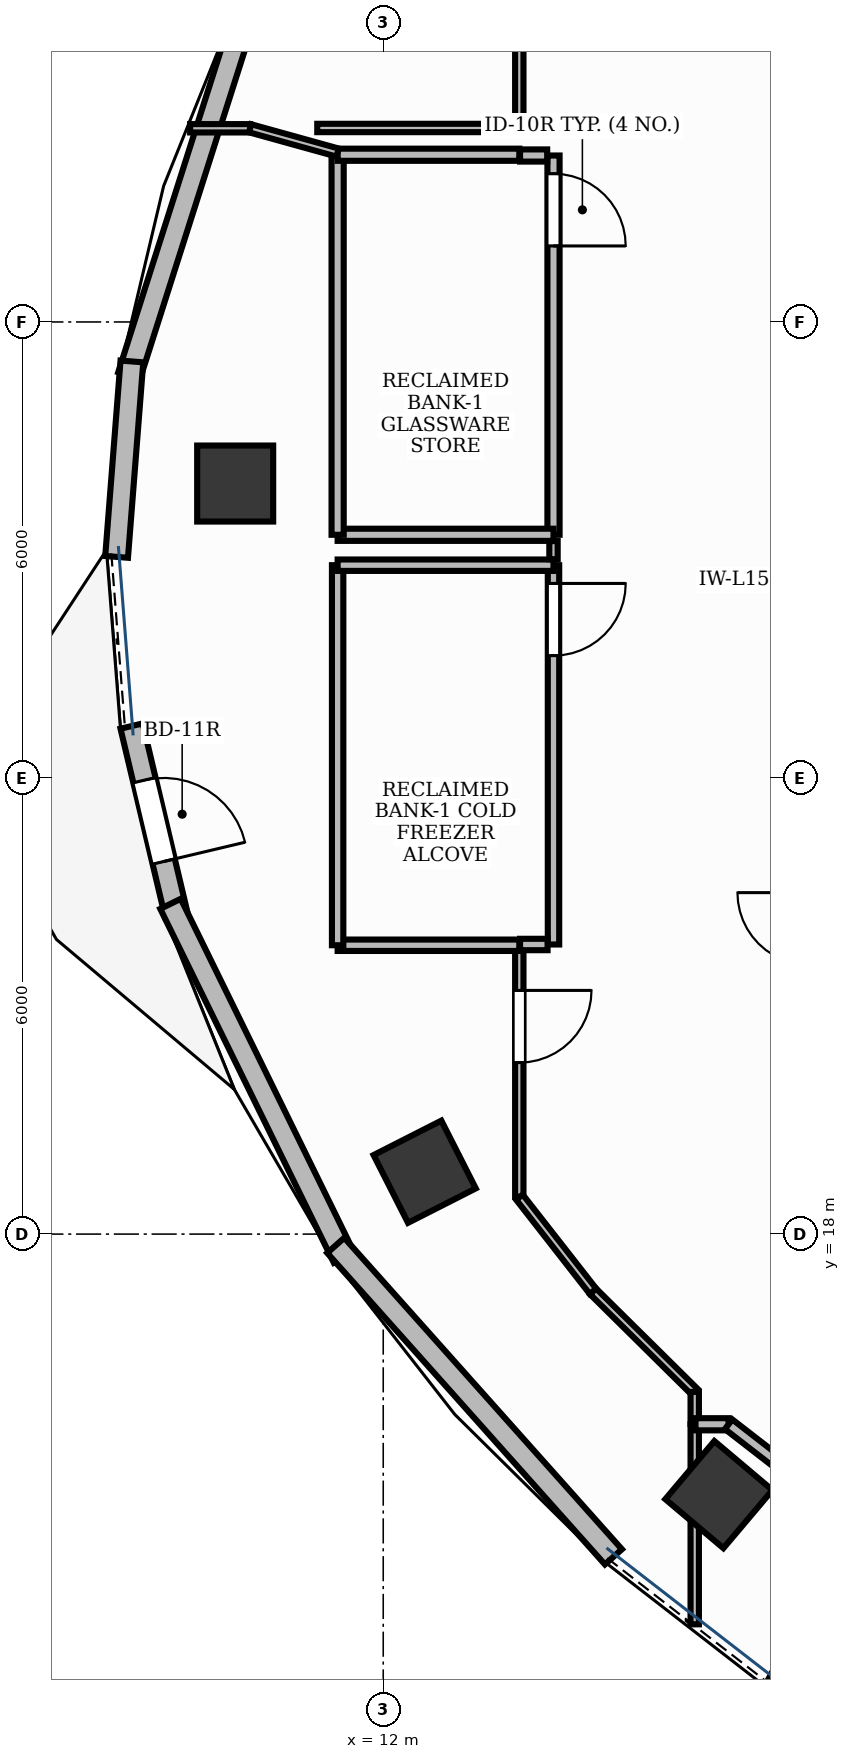
"""IFC4 building model, lengths in metres.
Left out: names, types, materials, properties, quantities, classifications, styles, units other than length and angle.
Written with IfcOpenShell. Run it as: python <this file> out.ifc"""

import sys

from ifc_helpers import new_model, si_unit, direction, frame, frame_2d, origin, origin_2d, place, context, subcontext, project, spatial, rectangle, extrude, element, fill, save


model = new_model("IFC4")
c1 = context("Model", 3, precision=1e-05, world=origin(), true_north=direction((0.0, 1.0)))
c2 = subcontext(c1, "Body", "Model", "MODEL_VIEW")
j1 = project(units=[si_unit("LENGTHUNIT", "METRE"), si_unit("PLANEANGLEUNIT", "RADIAN")], contexts=[c1])
p1 = place(None, origin())
s1 = spatial("IfcSite", under=j1, at=p1, CompositionType="ELEMENT")
p2 = place(p1, origin())
s2 = spatial("IfcBuilding", under=s1, at=p2, CompositionType="ELEMENT")
p3 = place(p2, frame((0.0, 0.0, 208.8)))
s3 = spatial("IfcBuildingStorey", under=s2, at=p3, CompositionType="ELEMENT", Elevation=208.8)
for number, where, z_axis, x_axis in (
    (1, (10.052, 27.874, -0.0), (0.0, 0.0, 1.0), (0.0, 1.0, 0.0)),
    (2, (12.545, 18.82, -0.0), (0.0, 0.0, 1.0), (-0.453, 0.891, 0.0)),
    (3, (16.416, 14.573, -0.0), (0.0, 0.0, 1.0), (-0.764, 0.645, 0.0)),
):
    element("IfcColumn", number, at=place(p3, frame(where, z_axis=z_axis, x_axis=x_axis)), inside=s3, PredefinedType="COLUMN", context=c2, shape_type="SweptSolid", body=[
        extrude(rectangle(XDim=1.0, YDim=1.0, at=origin_2d()), origin(), (0.0, 0.0, 1.0), 3.881),
    ])
p4 = place(p3, frame((8.689, 24.684, 0.0), z_axis=(0.0, 0.0, 1.0), x_axis=(0.230615918203, -0.973044859332, 0.0)))
e4 = element("IfcWall", 4, at=p4, inside=s3, PredefinedType="STANDARD", context=c2, shape_type="SweptSolid", body=[
    extrude(rectangle(XDim=2.563, YDim=0.3, at=frame_2d((1.281, 0.0))), origin(), (0.0, 0.0, 1.0), 3.88),
])
p5 = place(p4, frame((0.731, 0.0, 0.0)))
e5 = element("IfcOpeningElement", 5, at=p5, cuts=e4, PredefinedType="OPENING", context=c2, shape_type="SweptSolid", body=[
    extrude(rectangle(XDim=1.1, YDim=2.15, at=frame_2d((0.55, 1.075))), frame((0.0, 0.165, 0.0), z_axis=(0.0, -1.0, 0.0), x_axis=(1.0, 0.0, 0.0)), (0.0, 0.0, 1.0), 0.33),
])
p6 = place(p3, frame((10.198, 34.13, 0.0), z_axis=(0.0, 0.0, 1.0), x_axis=(-0.30372166002, -0.952760805887, 0.0)))
e6 = element("IfcWall", 6, at=p6, inside=s3, PredefinedType="STANDARD", context=c2, shape_type="SweptSolid", body=[
    extrude(rectangle(XDim=5.077, YDim=0.3, at=frame_2d((2.539, 0.0))), origin(), (0.0, 0.0, 1.0), 3.88),
])
p7 = place(p3, frame((8.693, 29.48, 0.0), z_axis=(0.0, 0.0, 1.0), x_axis=(-0.077999392987, -0.996953406481, 0.0)))
e7 = element("IfcWall", 7, at=p7, inside=s3, PredefinedType="STANDARD", context=c2, shape_type="SweptSolid", body=[
    extrude(rectangle(XDim=2.579, YDim=0.3, at=frame_2d((1.29, 0.0))), origin(), (0.0, 0.0, 1.0), 2.205),
])
p8 = place(p3, frame((9.201, 22.345, 0.0), z_axis=(0.0, 0.0, 1.0), x_axis=(0.440271072247, -0.897864902389, 0.0)))
e8 = element("IfcWall", 8, at=p8, inside=s3, PredefinedType="STANDARD", context=c2, shape_type="SweptSolid", body=[
    extrude(rectangle(XDim=5.187, YDim=0.3, at=frame_2d((2.593, 0.0))), origin(), (0.0, 0.0, 1.0), 2.205),
])
p9 = place(p3, frame((11.375, 17.851, 0.0), z_axis=(0.0, 0.0, 1.0), x_axis=(0.66549767703, -0.746399920866, 0.0)))
e9 = element("IfcWall", 9, at=p9, inside=s3, PredefinedType="STANDARD", context=c2, shape_type="SweptSolid", body=[
    extrude(rectangle(XDim=5.489, YDim=0.3, at=frame_2d((2.745, 0.0))), origin(), (0.0, 0.0, 1.0), 2.205),
])
p10 = place(p3, frame((17.079, 12.167, 0.0), z_axis=(0.0, 0.0, 1.0), x_axis=(0.88123472541, -0.472678917164, 0.0)))
e10 = element("IfcWall", 10, at=p10, inside=s3, PredefinedType="STANDARD", context=c2, shape_type="SweptSolid", body=[
    extrude(rectangle(XDim=5.997, YDim=0.3, at=frame_2d((2.998, 0.0))), origin(), (0.0, 0.0, 1.0), 2.205),
])
p11 = place(p3, frame((14.24, 26.8, 0.0), z_axis=(0.0, 0.0, 1.0), x_axis=(0.0, -1.0, 0.0)))
e11 = element("IfcWall", 11, at=p11, inside=s3, PredefinedType="PARTITIONING", context=c2, shape_type="SweptSolid", body=[
    extrude(rectangle(XDim=4.99, YDim=0.15, at=frame_2d((2.495, 0.0))), origin(), (0.0, 0.0, 1.0), 2.22),
])
p12 = place(p11, frame((0.24, 0.0, 0.0)))
e12 = element("IfcOpeningElement", 12, at=p12, cuts=e11, PredefinedType="OPENING", context=c2, shape_type="SweptSolid", body=[
    extrude(rectangle(XDim=0.95, YDim=2.15, at=frame_2d((0.475, 1.075))), frame((0.0, 0.09, 0.0), z_axis=(0.0, -1.0, 0.0), x_axis=(1.0, 0.0, 0.0)), (0.0, 0.0, 1.0), 0.18),
])
p13 = place(p3, frame((14.24, 32.19, 0.0), z_axis=(0.0, 0.0, 1.0), x_axis=(0.0, -1.0, 0.0)))
e13 = element("IfcWall", 13, at=p13, inside=s3, PredefinedType="PARTITIONING", context=c2, shape_type="SweptSolid", body=[
    extrude(rectangle(XDim=4.99, YDim=0.16, at=frame_2d((2.495, 0.0))), origin(), (0.0, 0.0, 1.0), 2.22),
])
p14 = place(p13, frame((0.24, 0.0, 0.0)))
e14 = element("IfcOpeningElement", 14, at=p14, cuts=e13, PredefinedType="OPENING", context=c2, shape_type="SweptSolid", body=[
    extrude(rectangle(XDim=0.95, YDim=2.15, at=frame_2d((0.475, 1.075))), frame((0.0, 0.095, 0.0), z_axis=(0.0, -1.0, 0.0), x_axis=(1.0, 0.0, 0.0)), (0.0, 0.0, 1.0), 0.19),
])
p15 = place(p3, frame((13.79, 21.79, 0.0), z_axis=(0.0, 0.0, 1.0), x_axis=(0.0, -1.0, 0.0)))
e15 = element("IfcWall", 15, at=p15, inside=s3, PredefinedType="MOVABLE", context=c2, shape_type="SweptSolid", body=[
    extrude(rectangle(XDim=3.298, YDim=0.11, at=frame_2d((1.649, 0.0))), origin(), (0.0, 0.0, 1.0), 2.22),
])
p16 = place(p15, frame((0.584, 0.0, 0.0)))
e16 = element("IfcOpeningElement", 16, at=p16, cuts=e15, PredefinedType="OPENING", context=c2, shape_type="SweptSolid", body=[
    extrude(rectangle(XDim=0.95, YDim=2.15, at=frame_2d((0.475, 1.075))), frame((0.0, 0.07, 0.0), z_axis=(0.0, -1.0, 0.0), x_axis=(1.0, 0.0, 0.0)), (0.0, 0.0, 1.0), 0.14),
])
p17 = place(p3, frame((14.162, 21.81, 0.0), z_axis=(0.0, 0.0, 1.0), x_axis=(-1.0, 0.0, 0.0)))
e17 = element("IfcWall", 17, at=p17, inside=s3, PredefinedType="PARTITIONING", context=c2, shape_type="SweptSolid", body=[
    extrude(rectangle(XDim=0.362, YDim=0.15, at=frame_2d((0.181, 0.0))), origin(), (0.0, 0.0, 1.0), 2.22),
])
p18 = place(p3, frame((13.79, 21.8, 0.0), z_axis=(0.0, 0.0, 1.0), x_axis=(-1.0, 0.0, 0.0)))
e18 = element("IfcWall", 18, at=p18, inside=s3, PredefinedType="PARTITIONING", context=c2, shape_type="SweptSolid", body=[
    extrude(rectangle(XDim=2.39, YDim=0.15, at=frame_2d((1.195, 0.0))), origin(), (0.0, 0.0, 1.0), 2.22),
])
p19 = place(p3, frame((11.4, 21.8, 0.0), z_axis=(0.0, 0.0, 1.0), x_axis=(0.0, 1.0, 0.0)))
e19 = element("IfcWall", 19, at=p19, inside=s3, PredefinedType="PARTITIONING", context=c2, shape_type="SweptSolid", body=[
    extrude(rectangle(XDim=5.0, YDim=0.15, at=frame_2d((2.5, 0.0))), origin(), (0.0, 0.0, 1.0), 2.22),
])
p20 = place(p3, frame((11.4, 26.8, 0.0), z_axis=(0.0, 0.0, 1.0), x_axis=(1.0, 0.0, 0.0)))
e20 = element("IfcWall", 20, at=p20, inside=s3, PredefinedType="PARTITIONING", context=c2, shape_type="SweptSolid", body=[
    extrude(rectangle(XDim=2.84, YDim=0.15, at=frame_2d((1.42, 0.0))), origin(), (0.0, 0.0, 1.0), 2.22),
])
p21 = place(p3, frame((13.8, 32.19, 0.0), z_axis=(0.0, 0.0, 1.0), x_axis=(1.0, 0.0, 0.0)))
e21 = element("IfcWall", 21, at=p21, inside=s3, PredefinedType="PARTITIONING", context=c2, shape_type="SweptSolid", body=[
    extrude(rectangle(XDim=0.357, YDim=0.16, at=frame_2d((0.178, 0.0))), origin(), (0.0, 0.0, 1.0), 2.22),
])
p22 = place(p3, frame((14.24, 27.2, 0.0), z_axis=(0.0, 0.0, 1.0), x_axis=(-1.0, 0.0, 0.0)))
e22 = element("IfcWall", 22, at=p22, inside=s3, PredefinedType="PARTITIONING", context=c2, shape_type="SweptSolid", body=[
    extrude(rectangle(XDim=2.84, YDim=0.16, at=frame_2d((1.42, 0.0))), origin(), (0.0, 0.0, 1.0), 2.22),
])
p23 = place(p3, frame((11.4, 27.2, 0.0), z_axis=(0.0, 0.0, 1.0), x_axis=(0.0, 1.0, 0.0)))
e23 = element("IfcWall", 23, at=p23, inside=s3, PredefinedType="PARTITIONING", context=c2, shape_type="SweptSolid", body=[
    extrude(rectangle(XDim=5.0, YDim=0.16, at=frame_2d((2.5, 0.0))), origin(), (0.0, 0.0, 1.0), 2.22),
])
p24 = place(p3, frame((11.4, 32.2, 0.0), z_axis=(0.0, 0.0, 1.0), x_axis=(1.0, 0.0, 0.0)))
e24 = element("IfcWall", 24, at=p24, inside=s3, PredefinedType="PARTITIONING", context=c2, shape_type="SweptSolid", body=[
    extrude(rectangle(XDim=2.39, YDim=0.16, at=frame_2d((1.195, 0.0))), origin(), (0.0, 0.0, 1.0), 2.22),
])
p25 = place(p3, frame((9.46, 32.548, 0.0), z_axis=(0.0, 0.0, 1.0), x_axis=(1.0, 0.0, 0.0)))
e25 = element("IfcWall", 25, at=p25, inside=s3, PredefinedType="MOVABLE", context=c2, shape_type="SweptSolid", body=[
    extrude(rectangle(XDim=0.789, YDim=0.11, at=frame_2d((0.394, 0.0))), origin(), (0.0, 0.0, 1.0), 2.22),
])
p26 = place(p3, frame((10.249, 32.548, 0.0), z_axis=(0.0, 0.0, 1.0), x_axis=(0.963570580791, -0.267454175203, 0.0)))
e26 = element("IfcWall", 26, at=p26, inside=s3, PredefinedType="MOVABLE", context=c2, shape_type="SweptSolid", body=[
    extrude(rectangle(XDim=1.195, YDim=0.11, at=frame_2d((0.597, 0.0))), origin(), (0.0, 0.0, 1.0), 2.22),
])
p27 = place(p3, frame((14.24, 27.117, 0.0), z_axis=(0.0, 0.0, 1.0), x_axis=(0.0, -1.0, 0.0)))
e27 = element("IfcWall", 27, at=p27, inside=s3, PredefinedType="MOVABLE", context=c2, shape_type="SweptSolid", body=[
    extrude(rectangle(XDim=0.239, YDim=0.11, at=frame_2d((0.12, 0.0))), origin(), (0.0, 0.0, 1.0), 2.22),
])
p28 = place(p3, frame((13.792, 18.486, 0.0), z_axis=(0.0, 0.0, 1.0), x_axis=(0.615625972761, -0.788038489962, 0.0)))
e28 = element("IfcWall", 28, at=p28, inside=s3, PredefinedType="MOVABLE", context=c2, shape_type="SweptSolid", body=[
    extrude(rectangle(XDim=1.573, YDim=0.11, at=frame_2d((0.787, 0.0))), origin(), (0.0, 0.0, 1.0), 2.22),
])
p29 = place(p3, frame((14.761, 17.245, 0.0), z_axis=(0.0, 0.0, 1.0), x_axis=(0.711186701462, -0.703003183253, 0.0)))
e29 = element("IfcWall", 29, at=p29, inside=s3, PredefinedType="MOVABLE", context=c2, shape_type="SweptSolid", body=[
    extrude(rectangle(XDim=1.879, YDim=0.11, at=frame_2d((0.94, 0.0))), origin(), (0.0, 0.0, 1.0), 2.22),
])
p30 = place(p3, frame((16.098, 15.924, 0.0), z_axis=(0.0, 0.0, 1.0), x_axis=(0.0, -1.0, 0.0)))
e30 = element("IfcWall", 30, at=p30, inside=s3, PredefinedType="MOVABLE", context=c2, shape_type="SweptSolid", body=[
    extrude(rectangle(XDim=0.422, YDim=0.11, at=frame_2d((0.211, 0.0))), origin(), (0.0, 0.0, 1.0), 2.22),
])
p31 = place(p3, frame((16.098, 15.498, 0.0), z_axis=(0.0, 0.0, 1.0), x_axis=(0.0, -1.0, 0.0)))
e31 = element("IfcWall", 31, at=p31, inside=s3, PredefinedType="MOVABLE", context=c2, shape_type="SweptSolid", body=[
    extrude(rectangle(XDim=2.632, YDim=0.11, at=frame_2d((1.316, 0.0))), origin(), (0.0, 0.0, 1.0), 2.22),
])
p32 = place(p3, frame((16.108, 15.498, 0.0), z_axis=(0.0, 0.0, 1.0), x_axis=(1.0, 0.0, 0.0)))
e32 = element("IfcWall", 32, at=p32, inside=s3, PredefinedType="PARTITIONING", context=c2, shape_type="SweptSolid", body=[
    extrude(rectangle(XDim=0.436, YDim=0.16, at=frame_2d((0.218, 0.0))), origin(), (0.0, 0.0, 1.0), 2.22),
])
p33 = place(p3, frame((16.544, 15.498, 0.0), z_axis=(0.0, 0.0, 1.0), x_axis=(0.790342017468, -0.612665892167, 0.0)))
e33 = element("IfcWall", 33, at=p33, inside=s3, PredefinedType="PARTITIONING", context=c2, shape_type="SweptSolid", body=[
    extrude(rectangle(XDim=2.428, YDim=0.16, at=frame_2d((1.214, 0.0))), origin(), (0.0, 0.0, 1.0), 2.22),
])
p34 = place(p3, frame((13.79, 35.508, 0.0), z_axis=(0.0, 0.0, 1.0), x_axis=(0.0, -1.0, 0.0)))
e34 = element("IfcWall", 34, at=p34, inside=s3, PredefinedType="MOVABLE", context=c2, shape_type="SweptSolid", body=[
    extrude(rectangle(XDim=2.956, YDim=0.11, at=frame_2d((1.478, 0.0))), origin(), (0.0, 0.0, 1.0), 2.22),
])
p35 = place(p3, frame((13.79, 32.552, 0.0), z_axis=(0.0, 0.0, 1.0), x_axis=(-1.0, 0.0, 0.0)))
e35 = element("IfcWall", 35, at=p35, inside=s3, PredefinedType="MOVABLE", context=c2, shape_type="SweptSolid", body=[
    extrude(rectangle(XDim=2.658, YDim=0.11, at=frame_2d((1.329, 0.0))), origin(), (0.0, 0.0, 1.0), 2.22),
])
p36 = place(p5, origin())
e36 = element("IfcDoor", 36, at=p36, inside=s3, OperationType="SINGLE_SWING_RIGHT", PredefinedType="DOOR", context=c2, shape_type="SweptSolid", body=[
    extrude(rectangle(XDim=1.1, YDim=2.15, at=frame_2d((0.55, 1.075))), frame((0.0, 0.025, 0.0), z_axis=(0.0, -1.0, 0.0), x_axis=(1.0, 0.0, 0.0)), (0.0, 0.0, 1.0), 0.05),
])
fill(e5, e36)
p37 = place(p12, origin())
e37 = element("IfcDoor", 37, at=p37, inside=s3, OperationType="SINGLE_SWING_LEFT", PredefinedType="DOOR", context=c2, shape_type="SweptSolid", body=[
    extrude(rectangle(XDim=0.95, YDim=2.15, at=frame_2d((0.475, 1.075))), frame((0.0, 0.025, 0.0), z_axis=(0.0, -1.0, 0.0), x_axis=(1.0, 0.0, 0.0)), (0.0, 0.0, 1.0), 0.05),
])
fill(e12, e37)
p38 = place(p14, origin())
e38 = element("IfcDoor", 38, at=p38, inside=s3, OperationType="SINGLE_SWING_RIGHT", PredefinedType="DOOR", context=c2, shape_type="SweptSolid", body=[
    extrude(rectangle(XDim=0.95, YDim=2.15, at=frame_2d((0.475, 1.075))), frame((0.0, 0.025, 0.0), z_axis=(0.0, -1.0, 0.0), x_axis=(1.0, 0.0, 0.0)), (0.0, 0.0, 1.0), 0.05),
])
fill(e14, e38)
p39 = place(p16, origin())
e39 = element("IfcDoor", 39, at=p39, inside=s3, OperationType="SINGLE_SWING_LEFT", PredefinedType="DOOR", context=c2, shape_type="SweptSolid", body=[
    extrude(rectangle(XDim=0.95, YDim=2.15, at=frame_2d((0.475, 1.075))), frame((0.0, 0.025, 0.0), z_axis=(0.0, -1.0, 0.0), x_axis=(1.0, 0.0, 0.0)), (0.0, 0.0, 1.0), 0.05),
])
fill(e16, e39)
save(model, sys.argv[1])
